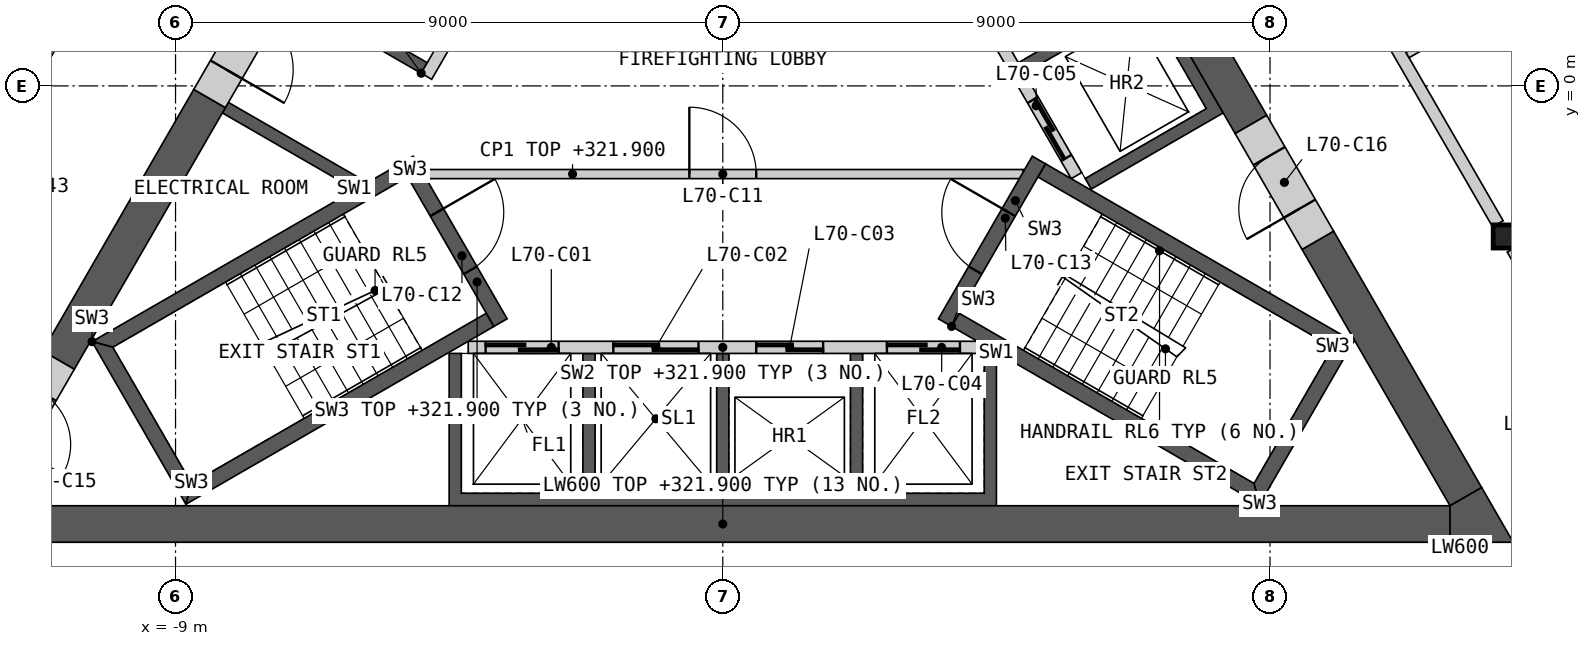
"""IFC4 building model, lengths in metres.
Left out: names, types, materials, properties, quantities, classifications, styles, units other than length and angle.
Written with IfcOpenShell. Run it as: python <this file> out.ifc"""

import sys

from ifc_helpers import new_model, si_unit, direction, frame, frame_2d, origin, origin_2d, place, context, subcontext, project, spatial, polyline, rectangle, i_section, outline, extrude, element, fill, save


model = new_model("IFC4")
c1 = context("Model", 3, precision=1e-05, world=origin(), true_north=direction((0.0, 1.0)))
c2 = subcontext(c1, "Body", "Model", "MODEL_VIEW")
j1 = project(units=[si_unit("LENGTHUNIT", "METRE"), si_unit("PLANEANGLEUNIT", "RADIAN")], contexts=[c1])
p1 = place(None, origin())
s1 = spatial("IfcSite", under=j1, at=p1, CompositionType="ELEMENT")
p2 = place(p1, origin())
s2 = spatial("IfcBuilding", under=s1, at=p2, CompositionType="ELEMENT")
p3 = place(p2, frame((0.0, 0.0, 318.8)))
s3 = spatial("IfcBuildingStorey", under=s2, at=p3, CompositionType="ELEMENT", Elevation=318.8)
p4 = place(p3, frame((12.868, -2.476, 0.0), z_axis=(0.0, 0.0, 1.0), x_axis=(1.0, 0.0, 0.0)))
e1 = element("IfcColumn", 1, at=p4, inside=s3, PredefinedType="COLUMN", context=c2, shape_type="SweptSolid", body=[
    extrude(i_section(OverallWidth=0.396, OverallDepth=0.381, WebThickness=0.019, FlangeThickness=0.03, at=origin_2d()), origin(), (0.0, 0.0, 1.0), 3.4),
])
p5 = place(p3, origin())
e2 = element("IfcWall", 2, at=p5, inside=s3, PredefinedType="SHEAR", context=c2, shape_type="SweptSolid", body=[
    extrude(outline(polyline([(4.5, -4.4), (4.5, -6.906), (-4.5, -6.906), (-4.5, -4.4), (-4.3, -4.4), (-4.3, -6.7), (-2.3, -6.7), (-2.3, -4.4), (-2.1, -4.4), (-2.1, -6.7), (-0.1, -6.7), (-0.1, -4.4), (0.1, -4.4), (0.1, -6.7), (2.1, -6.7), (2.1, -4.4), (2.3, -4.4), (2.3, -6.7), (4.3, -6.7), (4.3, -4.4), (4.5, -4.4)])), origin(), (0.0, 0.0, 1.0), 3.1),
])
p6 = place(p3, frame((-4.187, -4.3, 0.0), z_axis=(0.0, 0.0, 1.0), x_axis=(1.0, 0.0, 0.0)))
e3 = element("IfcWall", 3, at=p6, inside=s3, PredefinedType="SOLIDWALL", context=c2, shape_type="SweptSolid", body=[
    extrude(rectangle(XDim=8.373, YDim=0.2, at=frame_2d((4.187, 0.0))), origin(), (0.0, 0.0, 1.0), 3.1),
])
p7 = place(p6, frame((0.287, 0.0, 0.0)))
e4 = element("IfcOpeningElement", 4, at=p7, cuts=e3, PredefinedType="OPENING", context=c2, shape_type="SweptSolid", body=[
    extrude(rectangle(XDim=1.2, YDim=2.1, at=frame_2d((0.6, 1.05))), frame((0.0, 0.11, 0.0), z_axis=(0.0, -1.0, 0.0), x_axis=(1.0, 0.0, 0.0)), (0.0, 0.0, 1.0), 0.22),
])
p8 = place(p6, frame((2.387, 0.0, 0.0)))
e5 = element("IfcOpeningElement", 5, at=p8, cuts=e3, PredefinedType="OPENING", context=c2, shape_type="SweptSolid", body=[
    extrude(rectangle(XDim=1.4, YDim=2.1, at=frame_2d((0.7, 1.05))), frame((0.0, 0.11, 0.0), z_axis=(0.0, -1.0, 0.0), x_axis=(1.0, 0.0, 0.0)), (0.0, 0.0, 1.0), 0.22),
])
p9 = place(p6, frame((4.737, 0.0, 0.0)))
e6 = element("IfcOpeningElement", 6, at=p9, cuts=e3, PredefinedType="OPENING", context=c2, shape_type="SweptSolid", body=[
    extrude(rectangle(XDim=1.1, YDim=2.1, at=frame_2d((0.55, 1.05))), frame((0.0, 0.11, 0.0), z_axis=(0.0, -1.0, 0.0), x_axis=(1.0, 0.0, 0.0)), (0.0, 0.0, 1.0), 0.22),
])
p10 = place(p6, frame((6.887, 0.0, 0.0)))
e7 = element("IfcOpeningElement", 7, at=p10, cuts=e3, PredefinedType="OPENING", context=c2, shape_type="SweptSolid", body=[
    extrude(rectangle(XDim=1.2, YDim=2.1, at=frame_2d((0.6, 1.05))), frame((0.0, 0.11, 0.0), z_axis=(0.0, -1.0, 0.0), x_axis=(1.0, 0.0, 0.0)), (0.0, 0.0, 1.0), 0.22),
])
p11 = place(p3, origin())
e8 = element("IfcWall", 8, at=p11, inside=s3, PredefinedType="SHEAR", context=c2, shape_type="SweptSolid", body=[
    extrude(outline(polyline([(1.561, 6.097), (3.731, 7.35), (8.231, -0.444), (6.061, -1.697), (5.96, -1.524), (7.952, -0.374), (6.952, 1.358), (4.96, 0.208), (4.861, 0.381), (6.852, 1.531), (5.852, 3.263), (3.861, 2.113), (3.76, 2.287), (5.752, 3.437), (4.752, 5.169), (2.76, 4.019), (2.66, 4.192), (4.652, 5.342), (3.652, 7.074), (1.66, 5.924), (1.561, 6.097)])), origin(), (0.0, 0.0, 1.0), 3.1),
])
p12 = place(p3, frame((5.817, -1.476, 0.0), z_axis=(0.0, 0.0, 1.0), x_axis=(-0.500002616675, 0.866023893041, 0.0)))
e9 = element("IfcWall", 9, at=p12, inside=s3, PredefinedType="SOLIDWALL", context=c2, shape_type="SweptSolid", body=[
    extrude(rectangle(XDim=8.373, YDim=0.2, at=frame_2d((4.187, 0.0))), origin(), (0.0, 0.0, 1.0), 3.1),
])
p13 = place(p12, frame((0.337, 0.0, 0.0)))
e10 = element("IfcOpeningElement", 10, at=p13, cuts=e9, PredefinedType="OPENING", context=c2, shape_type="SweptSolid", body=[
    extrude(rectangle(XDim=1.1, YDim=2.1, at=frame_2d((0.55, 1.05))), frame((0.0, 0.11, 0.0), z_axis=(0.0, -1.0, 0.0), x_axis=(1.0, 0.0, 0.0)), (0.0, 0.0, 1.0), 0.22),
])
p14 = place(p12, frame((2.537, 0.0, 0.0)))
e11 = element("IfcOpeningElement", 11, at=p14, cuts=e9, PredefinedType="OPENING", context=c2, shape_type="SweptSolid", body=[
    extrude(rectangle(XDim=1.1, YDim=2.1, at=frame_2d((0.55, 1.05))), frame((0.0, 0.11, 0.0), z_axis=(0.0, -1.0, 0.0), x_axis=(1.0, 0.0, 0.0)), (0.0, 0.0, 1.0), 0.22),
])
p15 = place(p12, frame((4.737, 0.0, 0.0)))
e12 = element("IfcOpeningElement", 12, at=p15, cuts=e9, PredefinedType="OPENING", context=c2, shape_type="SweptSolid", body=[
    extrude(rectangle(XDim=1.1, YDim=2.1, at=frame_2d((0.55, 1.05))), frame((0.0, 0.11, 0.0), z_axis=(0.0, -1.0, 0.0), x_axis=(1.0, 0.0, 0.0)), (0.0, 0.0, 1.0), 0.22),
])
p16 = place(p12, frame((7.037, 0.0, 0.0)))
e13 = element("IfcOpeningElement", 13, at=p16, cuts=e9, PredefinedType="OPENING", context=c2, shape_type="SweptSolid", body=[
    extrude(rectangle(XDim=0.9, YDim=2.1, at=frame_2d((0.45, 1.05))), frame((0.0, 0.11, 0.0), z_axis=(0.0, -1.0, 0.0), x_axis=(1.0, 0.0, 0.0)), (0.0, 0.0, 1.0), 0.22),
])
p17 = place(p3, origin())
e14 = element("IfcWall", 14, at=p17, inside=s3, PredefinedType="SHEAR", context=c2, shape_type="SweptSolid", body=[
    extrude(outline(polyline([(-6.061, -1.697), (-8.231, -0.444), (-8.131, -0.271), (-5.96, -1.524), (-6.061, -1.697)])), origin(), (0.0, 0.0, 1.0), 3.1),
])
p18 = place(p3, origin())
e15 = element("IfcWall", 15, at=p18, inside=s3, PredefinedType="SHEAR", context=c2, shape_type="SweptSolid", body=[
    extrude(outline(polyline([(-4.96, 0.208), (-7.131, 1.461), (-3.731, 7.35), (-1.561, 6.097), (-1.66, 5.924), (-3.652, 7.074), (-5.752, 3.437), (-3.76, 2.287), (-3.861, 2.113), (-5.852, 3.263), (-6.852, 1.531), (-4.861, 0.381), (-4.96, 0.208)])), origin(), (0.0, 0.0, 1.0), 3.1),
])
p19 = place(p3, frame((-1.631, 5.776, 0.0), z_axis=(0.0, 0.0, 1.0), x_axis=(-0.499992876559, -0.866029516466, 0.0)))
e16 = element("IfcWall", 16, at=p19, inside=s3, PredefinedType="SOLIDWALL", context=c2, shape_type="SweptSolid", body=[
    extrude(rectangle(XDim=6.486, YDim=0.2, at=frame_2d((3.243, 0.0))), origin(), (0.0, 0.0, 1.0), 3.1),
])
p20 = place(p19, frame((1.537, 0.0, 0.0)))
e17 = element("IfcOpeningElement", 17, at=p20, cuts=e16, PredefinedType="OPENING", context=c2, shape_type="SweptSolid", body=[
    extrude(rectangle(XDim=0.9, YDim=2.1, at=frame_2d((0.45, 1.05))), frame((0.0, 0.11, 0.0), z_axis=(0.0, -1.0, 0.0), x_axis=(1.0, 0.0, 0.0)), (0.0, 0.0, 1.0), 0.22),
])
p21 = place(p19, frame((4.837, 0.0, 0.0)))
e18 = element("IfcOpeningElement", 18, at=p21, cuts=e16, PredefinedType="OPENING", context=c2, shape_type="SweptSolid", body=[
    extrude(rectangle(XDim=0.9, YDim=2.1, at=frame_2d((0.45, 1.05))), frame((0.0, 0.11, 0.0), z_axis=(0.0, -1.0, 0.0), x_axis=(1.0, 0.0, 0.0)), (0.0, 0.0, 1.0), 0.22),
])
p22 = place(p3, frame((-4.941, -1.45, 0.0), z_axis=(0.0, 0.0, 1.0), x_axis=(1.0, 0.0, 0.0)))
e19 = element("IfcWall", 19, at=p22, inside=s3, PredefinedType="PARTITIONING", context=c2, shape_type="SweptSolid", body=[
    extrude(rectangle(XDim=9.882, YDim=0.15, at=frame_2d((4.941, 0.0))), origin(), (0.0, 0.0, 1.0), 3.1),
])
p23 = place(p22, frame((4.391, 0.0, 0.0)))
e20 = element("IfcOpeningElement", 20, at=p23, cuts=e19, PredefinedType="OPENING", context=c2, shape_type="SweptSolid", body=[
    extrude(rectangle(XDim=1.1, YDim=2.1, at=frame_2d((0.55, 1.05))), frame((0.0, 0.085, 0.0), z_axis=(0.0, -1.0, 0.0), x_axis=(1.0, 0.0, 0.0)), (0.0, 0.0, 1.0), 0.17),
])
p24 = place(p3, origin())
e21 = element("IfcWall", 21, at=p24, inside=s3, PredefinedType="SHEAR", context=c2, shape_type="SweptSolid", body=[
    extrude(outline(polyline([(-5.307, -1.281), (-10.374, -4.206), (-10.032, -4.298), (-5.182, -1.498), (-5.307, -1.281)])), origin(), (0.0, 0.0, 1.0), 3.1),
])
p25 = place(p3, origin())
e22 = element("IfcWall", 22, at=p25, inside=s3, PredefinedType="SHEAR", context=c2, shape_type="SweptSolid", body=[
    extrude(outline(polyline([(-10.374, -4.206), (-8.83, -6.881), (-8.738, -6.539), (-10.032, -4.298), (-10.374, -4.206)])), origin(), (0.0, 0.0, 1.0), 3.1),
])
p26 = place(p3, origin())
e23 = element("IfcWall", 23, at=p26, inside=s3, PredefinedType="SHEAR", context=c2, shape_type="SweptSolid", body=[
    extrude(outline(polyline([(-8.738, -6.539), (-8.83, -6.881), (-3.763, -3.956), (-3.888, -3.739), (-8.738, -6.539)])), origin(), (0.0, 0.0, 1.0), 3.1),
])
p27 = place(p3, frame((-5.199, -1.219, 0.0), z_axis=(0.0, 0.0, 1.0), x_axis=(0.499982516597, -0.866035497597, 0.0)))
e24 = element("IfcWall", 24, at=p27, inside=s3, PredefinedType="SHEAR", context=c2, shape_type="SweptSolid", body=[
    extrude(rectangle(XDim=3.088, YDim=0.25, at=frame_2d((1.544, 0.0))), origin(), (0.0, 0.0, 1.0), 3.1),
])
p28 = place(p27, frame((0.994, 0.0, 0.0)))
e25 = element("IfcOpeningElement", 25, at=p28, cuts=e24, PredefinedType="OPENING", context=c2, shape_type="SweptSolid", body=[
    extrude(rectangle(XDim=1.1, YDim=2.1, at=frame_2d((0.55, 1.05))), frame((0.0, 0.135, 0.0), z_axis=(0.0, -1.0, 0.0), x_axis=(1.0, 0.0, 0.0)), (0.0, 0.0, 1.0), 0.27),
])
p29 = place(p3, origin())
e26 = element("IfcWall", 26, at=p29, inside=s3, PredefinedType="SHEAR", context=c2, shape_type="SweptSolid", body=[
    extrude(outline(polyline([(3.763, -3.956), (8.83, -6.881), (8.738, -6.539), (3.888, -3.739), (3.763, -3.956)])), origin(), (0.0, 0.0, 1.0), 3.1),
])
p30 = place(p3, origin())
e27 = element("IfcWall", 27, at=p30, inside=s3, PredefinedType="SHEAR", context=c2, shape_type="SweptSolid", body=[
    extrude(outline(polyline([(8.83, -6.881), (10.374, -4.206), (10.032, -4.298), (8.738, -6.539), (8.83, -6.881)])), origin(), (0.0, 0.0, 1.0), 3.1),
])
p31 = place(p3, origin())
e28 = element("IfcWall", 28, at=p31, inside=s3, PredefinedType="SHEAR", context=c2, shape_type="SweptSolid", body=[
    extrude(outline(polyline([(10.032, -4.298), (10.374, -4.206), (5.307, -1.281), (5.182, -1.498), (10.032, -4.298)])), origin(), (0.0, 0.0, 1.0), 3.1),
])
p32 = place(p3, frame((3.655, -3.893, 0.0), z_axis=(0.0, 0.0, 1.0), x_axis=(0.499982516597, 0.866035497597, 0.0)))
e29 = element("IfcWall", 29, at=p32, inside=s3, PredefinedType="SHEAR", context=c2, shape_type="SweptSolid", body=[
    extrude(rectangle(XDim=3.088, YDim=0.25, at=frame_2d((1.544, 0.0))), origin(), (0.0, 0.0, 1.0), 3.1),
])
p33 = place(p32, frame((0.994, 0.0, 0.0)))
e30 = element("IfcOpeningElement", 30, at=p33, cuts=e29, PredefinedType="OPENING", context=c2, shape_type="SweptSolid", body=[
    extrude(rectangle(XDim=1.1, YDim=2.1, at=frame_2d((0.55, 1.05))), frame((0.0, 0.135, 0.0), z_axis=(0.0, -1.0, 0.0), x_axis=(1.0, 0.0, 0.0)), (0.0, 0.0, 1.0), 0.27),
])
p34 = place(p3, frame((-11.961, -7.206, 0.0), z_axis=(0.0, 0.0, 1.0), x_axis=(1.0, 0.0, 0.0)))
e31 = element("IfcWall", 31, at=p34, inside=s3, PredefinedType="SHEAR", context=c2, shape_type="SweptSolid", body=[
    extrude(rectangle(XDim=23.921, YDim=0.6, at=frame_2d((11.961, 0.0))), origin(), (0.0, 0.0, 1.0), 3.1),
])
p35 = place(p3, frame((8.686, -0.634, 0.0), z_axis=(0.0, 0.0, 1.0), x_axis=(-0.50001836461, 0.866014800712, 0.0)))
e32 = element("IfcWall", 32, at=p35, inside=s3, PredefinedType="SHEAR", context=c2, shape_type="SweptSolid", body=[
    extrude(rectangle(XDim=10.451, YDim=0.6, at=frame_2d((5.225, 0.0))), origin(), (0.0, 0.0, 1.0), 3.1),
])
p36 = place(p3, frame((12.221, -6.756, 0.0), z_axis=(0.0, 0.0, 1.0), x_axis=(-0.50000604952, 0.866021911064, 0.0)))
e33 = element("IfcWall", 33, at=p36, inside=s3, PredefinedType="SHEAR", context=c2, shape_type="SweptSolid", body=[
    extrude(rectangle(XDim=4.869, YDim=0.6, at=frame_2d((2.434, 0.0))), origin(), (0.0, 0.0, 1.0), 3.1),
])
p37 = place(p3, frame((-8.44, -0.208, 0.0), z_axis=(0.0, 0.0, 1.0), x_axis=(-0.500007425856, -0.866021116422, 0.0)))
e34 = element("IfcWall", 34, at=p37, inside=s3, PredefinedType="SHEAR", context=c2, shape_type="SweptSolid", body=[
    extrude(rectangle(XDim=4.969, YDim=0.6, at=frame_2d((2.484, 0.0))), origin(), (0.0, 0.0, 1.0), 3.1),
])
p38 = place(p3, origin())
e35 = element("IfcWall", 35, at=p38, inside=s3, PredefinedType="SHEAR", context=c2, shape_type="SweptSolid", body=[
    extrude(outline(polyline([(11.961, -7.506), (11.961, -6.906), (12.48, -6.606), (13.0, -7.506), (11.961, -7.506)])), origin(), (0.0, 0.0, 1.0), 3.1),
])
p39 = place(p3, frame((-10.925, -4.511, 0.0), z_axis=(0.0, 0.0, 1.0), x_axis=(-0.500018667571, -0.866014625789, 0.0)))
e36 = element("IfcWall", 36, at=p39, inside=s3, PredefinedType="SHEAR", context=c2, shape_type="SweptSolid", body=[
    extrude(rectangle(XDim=2.592, YDim=0.6, at=frame_2d((1.296, 0.0))), origin(), (0.0, 0.0, 1.0), 3.1),
])
p40 = place(p39, frame((0.6, 0.0, 0.0)))
e37 = element("IfcOpeningElement", 37, at=p40, cuts=e36, PredefinedType="OPENING", context=c2, shape_type="SweptSolid", body=[
    extrude(rectangle(XDim=1.0, YDim=2.1, at=frame_2d((0.5, 1.05))), frame((0.0, 0.31, 0.0), z_axis=(0.0, -1.0, 0.0), x_axis=(1.0, 0.0, 0.0)), (0.0, 0.0, 1.0), 0.62),
])
p41 = place(p3, frame((9.786, -2.539, 0.0), z_axis=(0.0, 0.0, 1.0), x_axis=(-0.499981787252, 0.866035918664, 0.0)))
e38 = element("IfcWall", 38, at=p41, inside=s3, PredefinedType="SHEAR", context=c2, shape_type="SweptSolid", body=[
    extrude(rectangle(XDim=2.2, YDim=0.6, at=frame_2d((1.1, 0.0))), origin(), (0.0, 0.0, 1.0), 3.1),
])
p42 = place(p41, frame((0.6, 0.0, 0.0)))
e39 = element("IfcOpeningElement", 39, at=p42, cuts=e38, PredefinedType="OPENING", context=c2, shape_type="SweptSolid", body=[
    extrude(rectangle(XDim=1.0, YDim=2.1, at=frame_2d((0.5, 1.05))), frame((0.0, 0.31, 0.0), z_axis=(0.0, -1.0, 0.0), x_axis=(1.0, 0.0, 0.0)), (0.0, 0.0, 1.0), 0.62),
])
p43 = place(p3, frame((-7.34, 1.698, 0.0), z_axis=(0.0, 0.0, 1.0), x_axis=(-0.50002983664, -0.866008176907, 0.0)))
e40 = element("IfcWall", 40, at=p43, inside=s3, PredefinedType="SHEAR", context=c2, shape_type="SweptSolid", body=[
    extrude(rectangle(XDim=2.2, YDim=0.6, at=frame_2d((1.1, 0.0))), origin(), (0.0, 0.0, 1.0), 3.1),
])
p44 = place(p43, frame((0.55, 0.0, 0.0)))
e41 = element("IfcOpeningElement", 41, at=p44, cuts=e40, PredefinedType="OPENING", context=c2, shape_type="SweptSolid", body=[
    extrude(rectangle(XDim=1.1, YDim=2.1, at=frame_2d((0.55, 1.05))), frame((0.0, 0.31, 0.0), z_axis=(0.0, -1.0, 0.0), x_axis=(1.0, 0.0, 0.0)), (0.0, 0.0, 1.0), 0.62),
])
p45 = place(p3, frame((8.698, 4.745, 0.0), z_axis=(0.0, 0.0, 1.0), x_axis=(0.499984266882, -0.866034487114, 0.0)))
e42 = element("IfcWall", 42, at=p45, inside=s3, PredefinedType="PARTITIONING", context=c2, shape_type="SweptSolid", body=[
    extrude(rectangle(XDim=8.099, YDim=0.2, at=frame_2d((4.049, 0.0))), origin(), (0.0, 0.0, 1.0), 3.1),
])
p46 = place(p3, frame((-12.748, -2.269, 0.0), z_axis=(0.0, 0.0, 1.0), x_axis=(0.499984266882, 0.866034487114, 0.0)))
e43 = element("IfcWall", 43, at=p46, inside=s3, PredefinedType="PARTITIONING", context=c2, shape_type="SweptSolid", body=[
    extrude(rectangle(XDim=8.099, YDim=0.2, at=frame_2d((4.049, 0.0))), origin(), (0.0, 0.0, 1.0), 3.1),
])
p47 = place(p46, frame((1.164, 0.0, 0.0)))
e44 = element("IfcOpeningElement", 44, at=p47, cuts=e43, PredefinedType="OPENING", context=c2, shape_type="SweptSolid", body=[
    extrude(rectangle(XDim=1.0, YDim=2.1, at=frame_2d((0.5, 1.05))), frame((0.0, 0.11, 0.0), z_axis=(0.0, -1.0, 0.0), x_axis=(1.0, 0.0, 0.0)), (0.0, 0.0, 1.0), 0.22),
])
p48 = place(p3, frame((12.988, -2.684, 0.0), z_axis=(0.0, 0.0, 1.0), x_axis=(0.500003406062, -0.866023437285, 0.0)))
e45 = element("IfcWall", 45, at=p48, inside=s3, PredefinedType="PARTITIONING", context=c2, shape_type="SweptSolid", body=[
    extrude(rectangle(XDim=4.288, YDim=0.2, at=frame_2d((2.144, 0.0))), origin(), (0.0, 0.0, 1.0), 3.1),
])
p49 = place(p48, frame((2.521, 0.0, 0.0)))
e46 = element("IfcOpeningElement", 46, at=p49, cuts=e45, PredefinedType="OPENING", context=c2, shape_type="SweptSolid", body=[
    extrude(rectangle(XDim=1.0, YDim=2.1, at=frame_2d((0.5, 1.05))), frame((0.0, 0.11, 0.0), z_axis=(0.0, -1.0, 0.0), x_axis=(1.0, 0.0, 0.0)), (0.0, 0.0, 1.0), 0.22),
])
p50 = place(p3, frame((11.261, 0.506, 0.0), z_axis=(0.0, 0.0, 1.0), x_axis=(0.866024323732, 0.500001870701, 0.0)))
e47 = element("IfcWall", 47, at=p50, inside=s3, PredefinedType="PARTITIONING", context=c2, shape_type="SweptSolid", body=[
    extrude(rectangle(XDim=7.967, YDim=0.1, at=frame_2d((3.983, 0.0))), origin(), (0.0, 0.0, 1.0), 2.33),
])
p51 = place(p50, frame((5.865, 0.0, 0.0)))
e48 = element("IfcOpeningElement", 48, at=p51, cuts=e47, PredefinedType="OPENING", context=c2, shape_type="SweptSolid", body=[
    extrude(rectangle(XDim=0.95, YDim=2.1, at=frame_2d((0.475, 1.05))), frame((0.0, 0.06, 0.0), z_axis=(0.0, -1.0, 0.0), x_axis=(1.0, 0.0, 0.0)), (0.0, 0.0, 1.0), 0.12),
])
p52 = place(p7, origin())
e49 = element("IfcDoor", 49, at=p52, inside=s3, OperationType="SLIDING_TO_LEFT", PredefinedType="DOOR", context=c2, shape_type="SweptSolid", body=[
    extrude(rectangle(XDim=1.2, YDim=2.1, at=frame_2d((0.6, 1.05))), frame((0.0, 0.025, 0.0), z_axis=(0.0, -1.0, 0.0), x_axis=(1.0, 0.0, 0.0)), (0.0, 0.0, 1.0), 0.05),
])
fill(e4, e49)
p53 = place(p8, origin())
e50 = element("IfcDoor", 50, at=p53, inside=s3, OperationType="SLIDING_TO_LEFT", PredefinedType="DOOR", context=c2, shape_type="SweptSolid", body=[
    extrude(rectangle(XDim=1.4, YDim=2.1, at=frame_2d((0.7, 1.05))), frame((0.0, 0.025, 0.0), z_axis=(0.0, -1.0, 0.0), x_axis=(1.0, 0.0, 0.0)), (0.0, 0.0, 1.0), 0.05),
])
fill(e5, e50)
p54 = place(p9, origin())
e51 = element("IfcDoor", 51, at=p54, inside=s3, OperationType="SLIDING_TO_LEFT", PredefinedType="DOOR", context=c2, shape_type="SweptSolid", body=[
    extrude(rectangle(XDim=1.1, YDim=2.1, at=frame_2d((0.55, 1.05))), frame((0.0, 0.025, 0.0), z_axis=(0.0, -1.0, 0.0), x_axis=(1.0, 0.0, 0.0)), (0.0, 0.0, 1.0), 0.05),
])
fill(e6, e51)
p55 = place(p10, origin())
e52 = element("IfcDoor", 52, at=p55, inside=s3, OperationType="SLIDING_TO_LEFT", PredefinedType="DOOR", context=c2, shape_type="SweptSolid", body=[
    extrude(rectangle(XDim=1.2, YDim=2.1, at=frame_2d((0.6, 1.05))), frame((0.0, 0.025, 0.0), z_axis=(0.0, -1.0, 0.0), x_axis=(1.0, 0.0, 0.0)), (0.0, 0.0, 1.0), 0.05),
])
fill(e7, e52)
p56 = place(p13, origin())
e53 = element("IfcDoor", 53, at=p56, inside=s3, OperationType="SLIDING_TO_LEFT", PredefinedType="DOOR", context=c2, shape_type="SweptSolid", body=[
    extrude(rectangle(XDim=1.1, YDim=2.1, at=frame_2d((0.55, 1.05))), frame((0.0, 0.025, 0.0), z_axis=(0.0, -1.0, 0.0), x_axis=(1.0, 0.0, 0.0)), (0.0, 0.0, 1.0), 0.05),
])
fill(e10, e53)
p57 = place(p23, origin())
e54 = element("IfcDoor", 54, at=p57, inside=s3, OperationType="SINGLE_SWING_LEFT", PredefinedType="DOOR", context=c2, shape_type="SweptSolid", body=[
    extrude(rectangle(XDim=1.1, YDim=2.1, at=frame_2d((0.55, 1.05))), frame((0.0, 0.025, 0.0), z_axis=(0.0, -1.0, 0.0), x_axis=(1.0, 0.0, 0.0)), (0.0, 0.0, 1.0), 0.05),
])
fill(e20, e54)
p58 = place(p28, origin())
e55 = element("IfcDoor", 55, at=p58, inside=s3, OperationType="SINGLE_SWING_LEFT", PredefinedType="DOOR", context=c2, shape_type="SweptSolid", body=[
    extrude(rectangle(XDim=1.1, YDim=2.1, at=frame_2d((0.55, 1.05))), frame((0.0, 0.025, 0.0), z_axis=(0.0, -1.0, 0.0), x_axis=(1.0, 0.0, 0.0)), (0.0, 0.0, 1.0), 0.05),
])
fill(e25, e55)
p59 = place(p33, origin())
e56 = element("IfcDoor", 56, at=p59, inside=s3, OperationType="SINGLE_SWING_RIGHT", PredefinedType="DOOR", context=c2, shape_type="SweptSolid", body=[
    extrude(rectangle(XDim=1.1, YDim=2.1, at=frame_2d((0.55, 1.05))), frame((0.0, 0.025, 0.0), z_axis=(0.0, -1.0, 0.0), x_axis=(1.0, 0.0, 0.0)), (0.0, 0.0, 1.0), 0.05),
])
fill(e30, e56)
p60 = place(p42, origin())
e57 = element("IfcDoor", 57, at=p60, inside=s3, OperationType="SINGLE_SWING_LEFT", PredefinedType="DOOR", context=c2, shape_type="SweptSolid", body=[
    extrude(rectangle(XDim=1.0, YDim=2.1, at=frame_2d((0.5, 1.05))), frame((0.0, 0.055, 0.0), z_axis=(0.0, -1.0, 0.0), x_axis=(1.0, 0.0, 0.0)), (0.0, 0.0, 1.0), 0.05),
])
fill(e39, e57)
p61 = place(p44, origin())
e58 = element("IfcDoor", 58, at=p61, inside=s3, OperationType="SINGLE_SWING_RIGHT", PredefinedType="DOOR", context=c2, shape_type="SweptSolid", body=[
    extrude(rectangle(XDim=1.1, YDim=2.1, at=frame_2d((0.55, 1.05))), frame((0.0, 0.055, 0.0), z_axis=(0.0, -1.0, 0.0), x_axis=(1.0, 0.0, 0.0)), (0.0, 0.0, 1.0), 0.05),
])
fill(e41, e58)
save(model, sys.argv[1])
